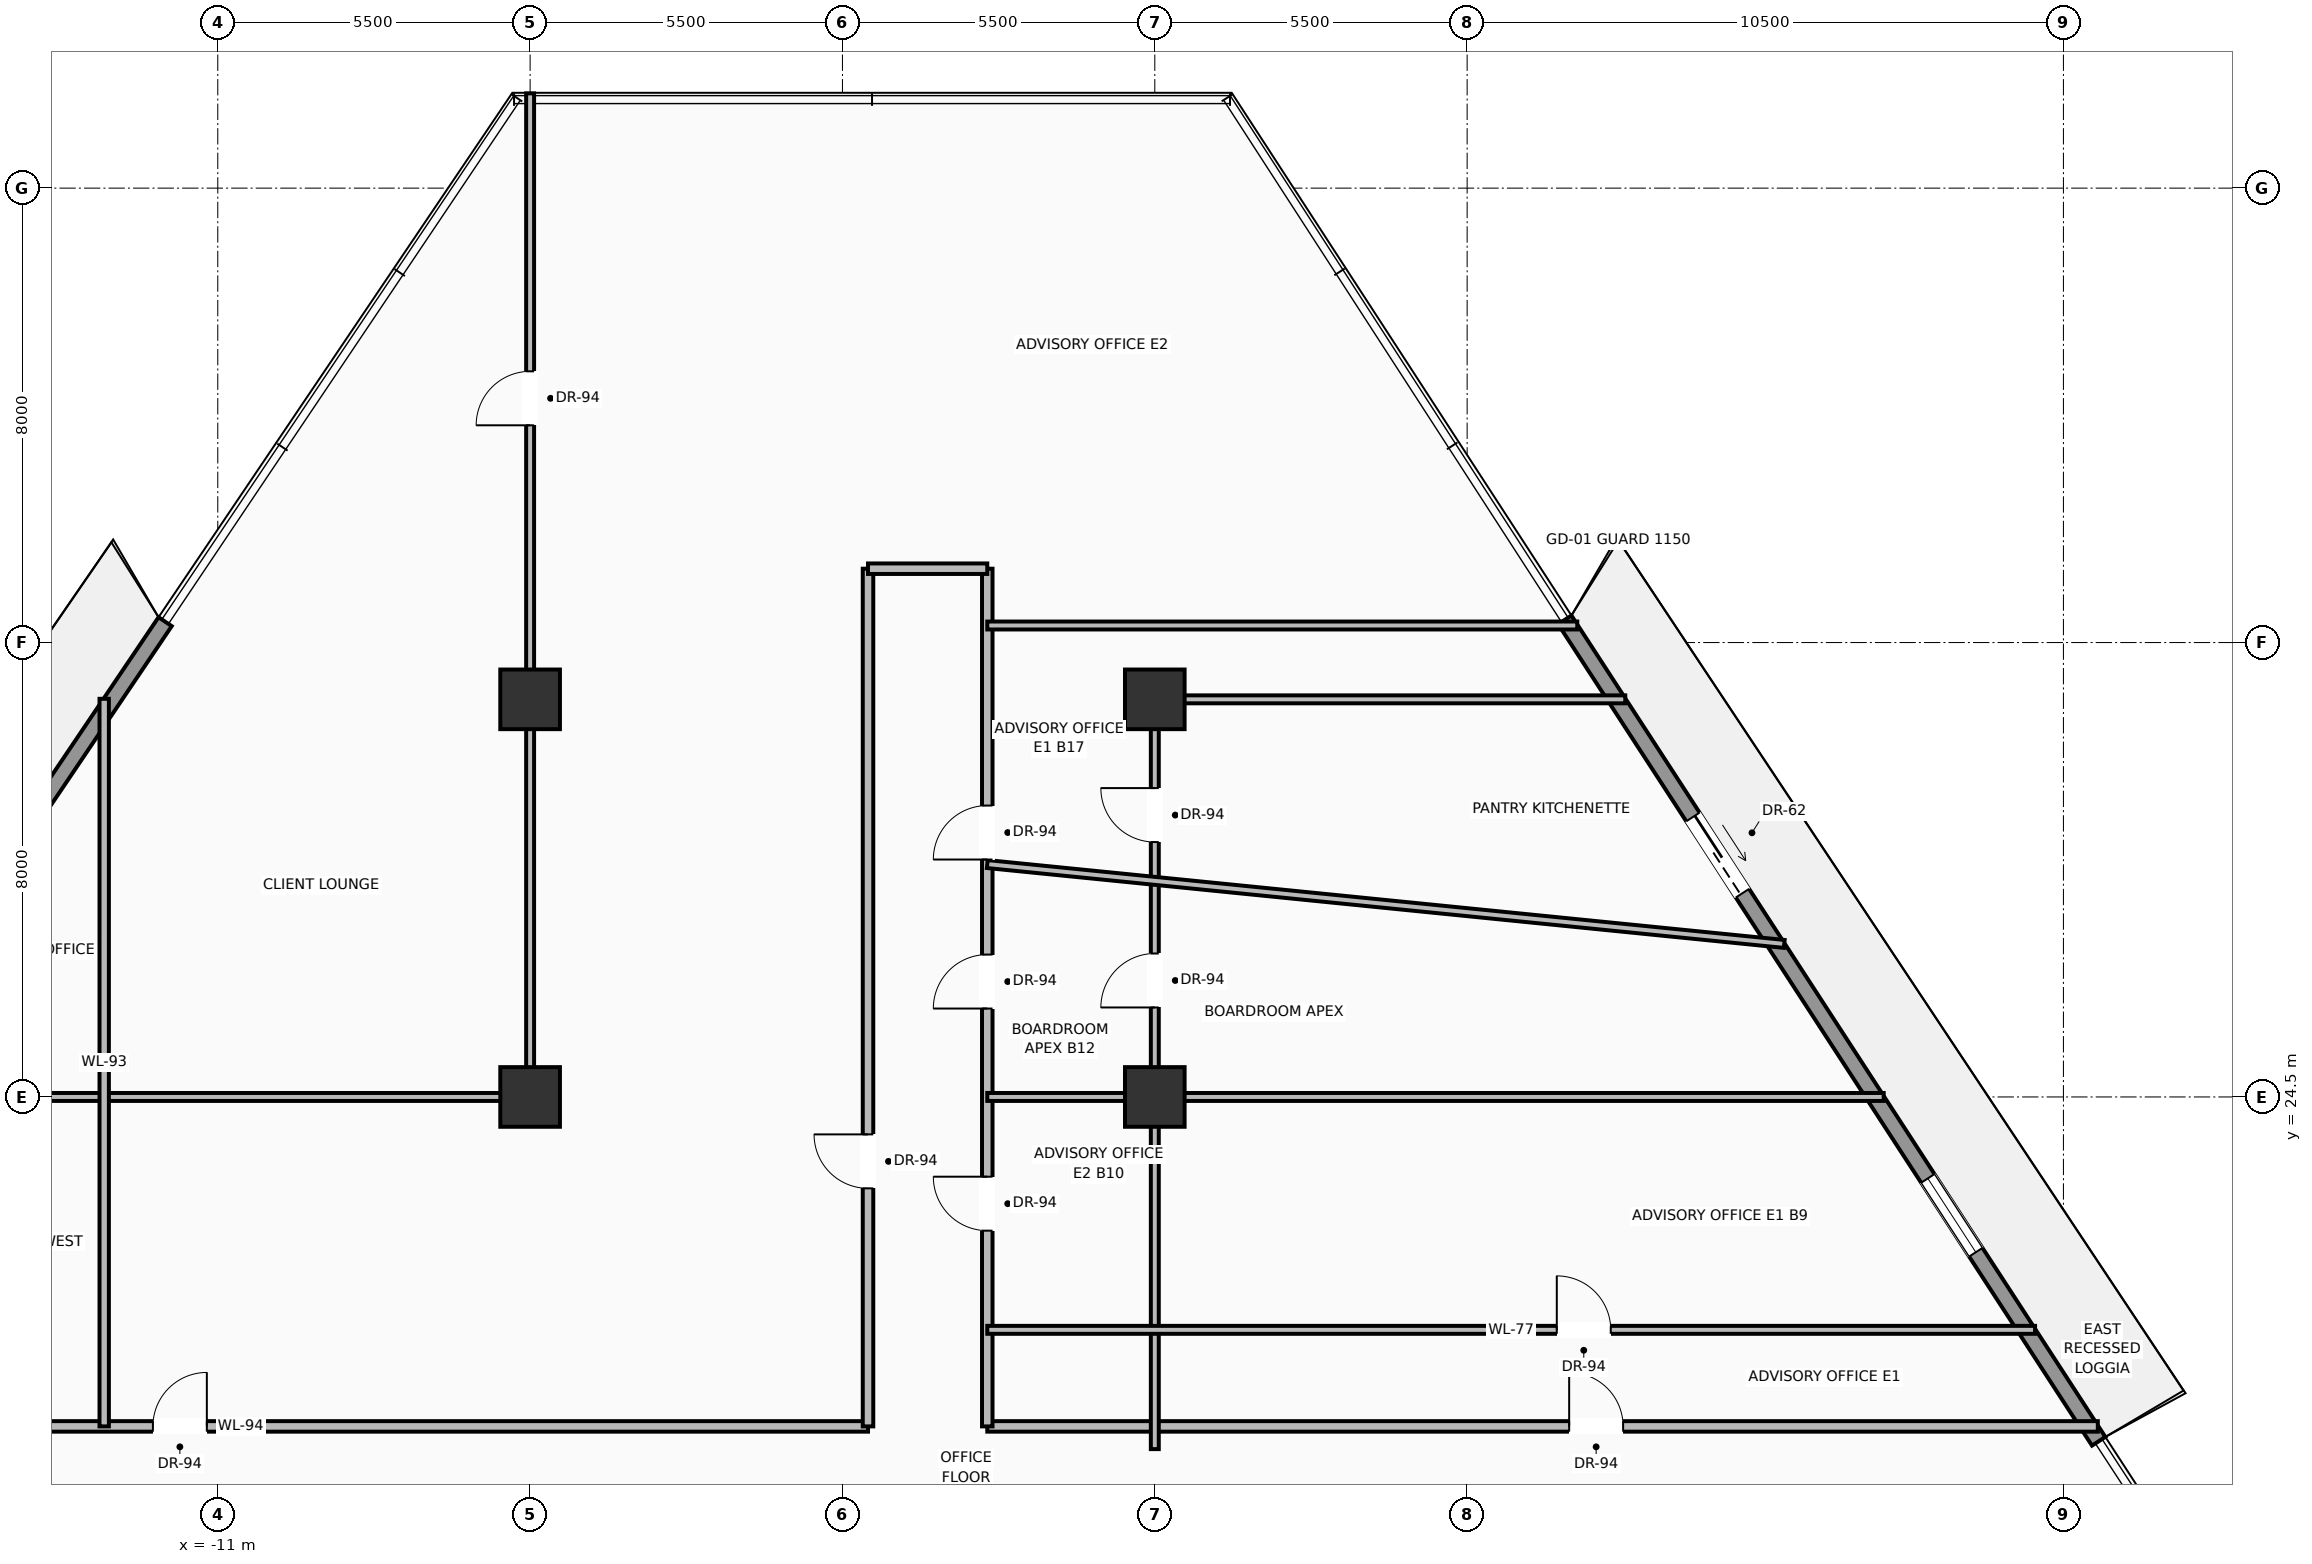
"""IFC4 building model, lengths in metres.
Left out: names, types, materials, properties, quantities, classifications, styles, units other than length and angle.
Written with IfcOpenShell. Run it as: python <this file> out.ifc"""

import sys

from ifc_helpers import new_model, si_unit, direction, frame, frame_2d, origin, origin_2d, place, context, subcontext, project, spatial, rectangle, extrude, source, transform, mapped, element, fill, save


model = new_model("IFC4")
c1 = context("Model", 3, precision=1e-05, world=origin(), true_north=direction((0.0, 1.0)))
c2 = subcontext(c1, "Body", "Model", "MODEL_VIEW")
j1 = project(units=[si_unit("LENGTHUNIT", "METRE"), si_unit("PLANEANGLEUNIT", "RADIAN")], contexts=[c1])
p1 = place(None, origin())
s1 = spatial("IfcSite", under=j1, at=p1, CompositionType="ELEMENT")
p2 = place(p1, origin())
s2 = spatial("IfcBuilding", under=s1, at=p2, CompositionType="ELEMENT")
p3 = place(p2, frame((0.0, 0.0, 87.7)))
s3 = spatial("IfcBuildingStorey", under=s2, at=p3, CompositionType="ELEMENT", Elevation=87.7)
m1 = source(origin(), c2, "Body", "SweptSolid", [
    extrude(rectangle(XDim=1.05, YDim=1.05, at=origin_2d()), origin(), (0.0, 0.0, 1.0), 3.7),
])
for number, where, z_axis, x_axis in (
    (1, (-5.5, 24.5, 0.0), (0.0, 0.0, 1.0), (1.0, 0.0, 0.0)),
    (2, (5.5, 24.5, 0.0), (0.0, 0.0, 1.0), (1.0, 0.0, 0.0)),
    (3, (-5.5, 31.5, 0.0), (0.0, 0.0, 1.0), (1.0, 0.0, 0.0)),
    (4, (5.5, 31.5, 0.0), (0.0, 0.0, 1.0), (1.0, 0.0, 0.0)),
):
    element("IfcColumn", number, at=place(p3, frame(where, z_axis=z_axis, x_axis=x_axis)), inside=s3, PredefinedType="COLUMN", context=c2, shape_type="MappedRepresentation", body=[
        mapped(m1, transform((0.0, 0.0, 0.0), scale=1.0)),
    ])
p4 = place(p3, frame((-21.717, 18.359, 0.0), z_axis=(0.0, 0.0, 1.0), x_axis=(0.559343000378, 0.828936311141, 0.0)))
e5 = element("IfcWall", 5, at=p4, inside=s3, PredefinedType="SOLIDWALL", context=c2, shape_type="SweptSolid", body=[
    extrude(rectangle(XDim=17.502, YDim=0.28, at=frame_2d((8.751, 0.0))), origin(), (0.0, 0.0, 1.0), 3.03),
])
p5 = place(p4, frame((4.201, 0.0, 0.0)))
e6 = element("IfcOpeningElement", 6, at=p5, cuts=e5, PredefinedType="OPENING", context=c2, shape_type="SweptSolid", body=[
    extrude(rectangle(XDim=1.6, YDim=2.35, at=frame_2d((0.8, 1.175))), frame((0.0, 0.15, 0.0), z_axis=(0.0, -1.0, 0.0), x_axis=(1.0, 0.0, 0.0)), (0.0, 0.0, 1.0), 0.3),
])
p6 = place(p4, frame((11.902, 0.0, 0.9)))
e7 = element("IfcOpeningElement", 7, at=p6, cuts=e5, PredefinedType="OPENING", context=c2, shape_type="SweptSolid", body=[
    extrude(rectangle(XDim=1.55, YDim=1.85, at=frame_2d((0.775, 0.925))), frame((0.0, 0.15, 0.0), z_axis=(0.0, -1.0, 0.0), x_axis=(1.0, 0.0, 0.0)), (0.0, 0.0, 1.0), 0.3),
])
p7 = place(p3, frame((12.719, 32.899, 0.0), z_axis=(0.0, 0.0, 1.0), x_axis=(0.545043573971, -0.838407718519, 0.0)))
e8 = element("IfcWall", 8, at=p7, inside=s3, PredefinedType="SOLIDWALL", context=c2, shape_type="SweptSolid", body=[
    extrude(rectangle(XDim=17.248, YDim=0.28, at=frame_2d((8.624, 0.0))), origin(), (0.0, 0.0, 1.0), 3.03),
])
p8 = place(p7, frame((4.14, 0.0, 0.0)))
e9 = element("IfcOpeningElement", 9, at=p8, cuts=e8, PredefinedType="OPENING", context=c2, shape_type="SweptSolid", body=[
    extrude(rectangle(XDim=1.6, YDim=2.35, at=frame_2d((0.8, 1.175))), frame((0.0, 0.15, 0.0), z_axis=(0.0, -1.0, 0.0), x_axis=(1.0, 0.0, 0.0)), (0.0, 0.0, 1.0), 0.3),
])
p9 = place(p7, frame((11.729, 0.0, 0.9)))
e10 = element("IfcOpeningElement", 10, at=p9, cuts=e8, PredefinedType="OPENING", context=c2, shape_type="SweptSolid", body=[
    extrude(rectangle(XDim=1.55, YDim=1.85, at=frame_2d((0.775, 0.925))), frame((0.0, 0.15, 0.0), z_axis=(0.0, -1.0, 0.0), x_axis=(1.0, 0.0, 0.0)), (0.0, 0.0, 1.0), 0.3),
])
p10 = place(p3, frame((-21.644, 18.7, 0.0), z_axis=(0.0, 0.0, 1.0), x_axis=(1.0, 0.0, 0.0)))
e11 = element("IfcWall", 11, at=p10, inside=s3, PredefinedType="PARTITIONING", context=c2, shape_type="SweptSolid", body=[
    extrude(rectangle(XDim=22.094, YDim=0.185, at=frame_2d((11.047, 0.0))), origin(), (0.0, 0.0, 1.0), 2.747),
])
p11 = place(p10, frame((9.501, 0.0, 0.0)))
e12 = element("IfcOpeningElement", 12, at=p11, cuts=e11, PredefinedType="OPENING", context=c2, shape_type="SweptSolid", body=[
    extrude(rectangle(XDim=0.95, YDim=2.2, at=frame_2d((0.475, 1.1))), frame((0.0, 0.103, 0.0), z_axis=(0.0, -1.0, 0.0), x_axis=(1.0, 0.0, 0.0)), (0.0, 0.0, 1.0), 0.205),
])
p12 = place(p10, frame((4.201, 0.0, 0.0)))
e13 = element("IfcOpeningElement", 13, at=p12, cuts=e11, PredefinedType="OPENING", context=c2, shape_type="SweptSolid", body=[
    extrude(rectangle(XDim=0.95, YDim=2.2, at=frame_2d((0.475, 1.1))), frame((0.0, 0.103, 0.0), z_axis=(0.0, -1.0, 0.0), x_axis=(1.0, 0.0, 0.0)), (0.0, 0.0, 1.0), 0.205),
])
p13 = place(p3, frame((2.55, 18.7, 0.0), z_axis=(0.0, 0.0, 1.0), x_axis=(1.0, 0.0, 0.0)))
e14 = element("IfcWall", 14, at=p13, inside=s3, PredefinedType="PARTITIONING", context=c2, shape_type="SweptSolid", body=[
    extrude(rectangle(XDim=19.555, YDim=0.185, at=frame_2d((9.778, 0.0))), origin(), (0.0, 0.0, 1.0), 2.747),
])
p14 = place(p13, frame((10.247, 0.0, 0.0)))
e15 = element("IfcOpeningElement", 15, at=p14, cuts=e14, PredefinedType="OPENING", context=c2, shape_type="SweptSolid", body=[
    extrude(rectangle(XDim=0.95, YDim=2.2, at=frame_2d((0.475, 1.1))), frame((0.0, 0.103, 0.0), z_axis=(0.0, -1.0, 0.0), x_axis=(1.0, 0.0, 0.0)), (0.0, 0.0, 1.0), 0.205),
])
p15 = place(p3, frame((0.45, 18.7, 0.0), z_axis=(0.0, 0.0, 1.0), x_axis=(0.0, 1.0, 0.0)))
e16 = element("IfcWall", 16, at=p15, inside=s3, PredefinedType="PARTITIONING", context=c2, shape_type="SweptSolid", body=[
    extrude(rectangle(XDim=15.1, YDim=0.185, at=frame_2d((7.55, 0.0))), origin(), (0.0, 0.0, 1.0), 2.747),
])
p16 = place(p15, frame((4.191, 0.0, 0.0)))
e17 = element("IfcOpeningElement", 17, at=p16, cuts=e16, PredefinedType="OPENING", context=c2, shape_type="SweptSolid", body=[
    extrude(rectangle(XDim=0.95, YDim=2.2, at=frame_2d((0.475, 1.1))), frame((0.0, 0.103, 0.0), z_axis=(0.0, -1.0, 0.0), x_axis=(1.0, 0.0, 0.0)), (0.0, 0.0, 1.0), 0.205),
])
p17 = place(p3, frame((2.55, 18.7, 0.0), z_axis=(0.0, 0.0, 1.0), x_axis=(0.0, 1.0, 0.0)))
e18 = element("IfcWall", 18, at=p17, inside=s3, PredefinedType="PARTITIONING", context=c2, shape_type="SweptSolid", body=[
    extrude(rectangle(XDim=15.1, YDim=0.185, at=frame_2d((7.55, 0.0))), origin(), (0.0, 0.0, 1.0), 2.747),
])
p18 = place(p17, frame((9.98, 0.0, 0.0)))
e19 = element("IfcOpeningElement", 19, at=p18, cuts=e18, PredefinedType="OPENING", context=c2, shape_type="SweptSolid", body=[
    extrude(rectangle(XDim=0.95, YDim=2.2, at=frame_2d((0.475, 1.1))), frame((0.0, 0.103, 0.0), z_axis=(0.0, -1.0, 0.0), x_axis=(1.0, 0.0, 0.0)), (0.0, 0.0, 1.0), 0.205),
])
p19 = place(p17, frame((3.446, 0.0, 0.0)))
e20 = element("IfcOpeningElement", 20, at=p19, cuts=e18, PredefinedType="OPENING", context=c2, shape_type="SweptSolid", body=[
    extrude(rectangle(XDim=0.95, YDim=2.2, at=frame_2d((0.475, 1.1))), frame((0.0, 0.103, 0.0), z_axis=(0.0, -1.0, 0.0), x_axis=(1.0, 0.0, 0.0)), (0.0, 0.0, 1.0), 0.205),
])
p20 = place(p17, frame((7.357, 0.0, 0.0)))
e21 = element("IfcOpeningElement", 21, at=p20, cuts=e18, PredefinedType="OPENING", context=c2, shape_type="SweptSolid", body=[
    extrude(rectangle(XDim=0.95, YDim=2.2, at=frame_2d((0.475, 1.1))), frame((0.0, 0.103, 0.0), z_axis=(0.0, -1.0, 0.0), x_axis=(1.0, 0.0, 0.0)), (0.0, 0.0, 1.0), 0.205),
])
p21 = place(p3, frame((0.45, 33.8, 0.0), z_axis=(0.0, 0.0, 1.0), x_axis=(1.0, 0.0, 0.0)))
e22 = element("IfcWall", 22, at=p21, inside=s3, PredefinedType="PARTITIONING", context=c2, shape_type="SweptSolid", body=[
    extrude(rectangle(XDim=2.1, YDim=0.185, at=frame_2d((1.05, 0.0))), origin(), (0.0, 0.0, 1.0), 3.442),
])
p22 = place(p3, frame((-5.5, 24.5, 0.0), z_axis=(0.0, 0.0, 1.0), x_axis=(0.0, 1.0, 0.0)))
e23 = element("IfcWall", 23, at=p22, inside=s3, PredefinedType="PARTITIONING", context=c2, shape_type="SweptSolid", body=[
    extrude(rectangle(XDim=17.668, YDim=0.14, at=frame_2d((8.834, 0.0))), origin(), (0.0, 0.0, 1.0), 2.747),
])
p23 = place(p22, frame((11.825, 0.0, 0.0)))
e24 = element("IfcOpeningElement", 24, at=p23, cuts=e23, PredefinedType="OPENING", context=c2, shape_type="SweptSolid", body=[
    extrude(rectangle(XDim=0.95, YDim=2.2, at=frame_2d((0.475, 1.1))), frame((0.0, 0.08, 0.0), z_axis=(0.0, -1.0, 0.0), x_axis=(1.0, 0.0, 0.0)), (0.0, 0.0, 1.0), 0.16),
])
p24 = place(p3, frame((5.5, 18.3, 0.0), z_axis=(0.0, 0.0, 1.0), x_axis=(0.0, 1.0, 0.0)))
e25 = element("IfcWall", 25, at=p24, inside=s3, PredefinedType="PARTITIONING", context=c2, shape_type="SweptSolid", body=[
    extrude(rectangle(XDim=13.2, YDim=0.14, at=frame_2d((6.6, 0.0))), origin(), (0.0, 0.0, 1.0), 2.747),
])
p25 = place(p24, frame((10.688, 0.0, 0.0)))
e26 = element("IfcOpeningElement", 26, at=p25, cuts=e25, PredefinedType="OPENING", context=c2, shape_type="SweptSolid", body=[
    extrude(rectangle(XDim=0.95, YDim=2.2, at=frame_2d((0.475, 1.1))), frame((0.0, 0.08, 0.0), z_axis=(0.0, -1.0, 0.0), x_axis=(1.0, 0.0, 0.0)), (0.0, 0.0, 1.0), 0.16),
])
p26 = place(p24, frame((7.775, 0.0, 0.0)))
e27 = element("IfcOpeningElement", 27, at=p26, cuts=e25, PredefinedType="OPENING", context=c2, shape_type="SweptSolid", body=[
    extrude(rectangle(XDim=0.95, YDim=2.2, at=frame_2d((0.475, 1.1))), frame((0.0, 0.08, 0.0), z_axis=(0.0, -1.0, 0.0), x_axis=(1.0, 0.0, 0.0)), (0.0, 0.0, 1.0), 0.16),
])
p27 = place(p3, frame((-17.73, 24.5, 0.0), z_axis=(0.0, 0.0, 1.0), x_axis=(1.0, 0.0, 0.0)))
e28 = element("IfcWall", 28, at=p27, inside=s3, PredefinedType="PARTITIONING", context=c2, shape_type="SweptSolid", body=[
    extrude(rectangle(XDim=12.23, YDim=0.14, at=frame_2d((6.115, 0.0))), origin(), (0.0, 0.0, 1.0), 2.747),
])
p28 = place(p27, frame((2.235, 0.0, 0.0)))
e29 = element("IfcOpeningElement", 29, at=p28, cuts=e28, PredefinedType="OPENING", context=c2, shape_type="SweptSolid", body=[
    extrude(rectangle(XDim=0.95, YDim=2.2, at=frame_2d((0.475, 1.1))), frame((0.0, 0.08, 0.0), z_axis=(0.0, -1.0, 0.0), x_axis=(1.0, 0.0, 0.0)), (0.0, 0.0, 1.0), 0.16),
])
p29 = place(p3, frame((5.5, 31.5, 0.0), z_axis=(0.0, 0.0, 1.0), x_axis=(1.0, 0.0, 0.0)))
e30 = element("IfcWall", 30, at=p29, inside=s3, PredefinedType="PARTITIONING", context=c2, shape_type="SweptSolid", body=[
    extrude(rectangle(XDim=8.284, YDim=0.14, at=frame_2d((4.142, 0.0))), origin(), (0.0, 0.0, 1.0), 2.747),
])
p30 = place(p3, frame((2.55, 20.4, 0.0), z_axis=(0.0, 0.0, 1.0), x_axis=(1.0, 0.0, 0.0)))
e31 = element("IfcWall", 31, at=p30, inside=s3, PredefinedType="PARTITIONING", context=c2, shape_type="SweptSolid", body=[
    extrude(rectangle(XDim=18.45, YDim=0.14, at=frame_2d((9.225, 0.0))), origin(), (0.0, 0.0, 1.0), 2.747),
])
p31 = place(p30, frame((10.029, 0.0, 0.0)))
e32 = element("IfcOpeningElement", 32, at=p31, cuts=e31, PredefinedType="OPENING", context=c2, shape_type="SweptSolid", body=[
    extrude(rectangle(XDim=0.95, YDim=2.2, at=frame_2d((0.475, 1.1))), frame((0.0, 0.08, 0.0), z_axis=(0.0, -1.0, 0.0), x_axis=(1.0, 0.0, 0.0)), (0.0, 0.0, 1.0), 0.16),
])
p32 = place(p3, frame((2.55, 24.5, 0.0), z_axis=(0.0, 0.0, 1.0), x_axis=(1.0, 0.0, 0.0)))
e33 = element("IfcWall", 33, at=p32, inside=s3, PredefinedType="PARTITIONING", context=c2, shape_type="SweptSolid", body=[
    extrude(rectangle(XDim=15.785, YDim=0.14, at=frame_2d((7.893, 0.0))), origin(), (0.0, 0.0, 1.0), 2.747),
])
p33 = place(p3, frame((2.55, 28.6, 0.0), z_axis=(0.0, 0.0, 1.0), x_axis=(0.995018663193, -0.099688815304, 0.0)))
e34 = element("IfcWall", 34, at=p33, inside=s3, PredefinedType="PARTITIONING", context=c2, shape_type="SweptSolid", body=[
    extrude(rectangle(XDim=14.104, YDim=0.14, at=frame_2d((7.052, 0.0))), origin(), (0.0, 0.0, 1.0), 2.747),
])
p34 = place(p3, frame((2.55, 32.8, 0.0), z_axis=(0.0, 0.0, 1.0), x_axis=(1.0, 0.0, 0.0)))
e35 = element("IfcWall", 35, at=p34, inside=s3, PredefinedType="PARTITIONING", context=c2, shape_type="SweptSolid", body=[
    extrude(rectangle(XDim=10.389, YDim=0.14, at=frame_2d((5.195, 0.0))), origin(), (0.0, 0.0, 1.0), 2.747),
])
p35 = place(p3, frame((-13.0, 18.7, 0.0), z_axis=(0.0, 0.0, 1.0), x_axis=(0.0, 1.0, 0.0)))
e36 = element("IfcWall", 36, at=p35, inside=s3, PredefinedType="PARTITIONING", context=c2, shape_type="SweptSolid", body=[
    extrude(rectangle(XDim=12.81, YDim=0.165, at=frame_2d((6.405, 0.0))), origin(), (0.0, 0.0, 1.0), 2.747),
])
m2 = source(origin(), c2, "Body", "SweptSolid", [
    extrude(rectangle(XDim=1.6, YDim=2.35, at=frame_2d((0.8, 1.175))), frame((0.0, 0.025, 0.0), z_axis=(0.0, -1.0, 0.0), x_axis=(1.0, 0.0, 0.0)), (0.0, 0.0, 1.0), 0.05),
])
p36 = place(p8, origin())
e37 = element("IfcDoor", 37, at=p36, inside=s3, OperationType="SLIDING_TO_RIGHT", PredefinedType="DOOR", context=c2, shape_type="MappedRepresentation", body=[
    mapped(m2, transform((0.0, 0.0, 0.0), scale=1.0)),
])
fill(e9, e37)
m3 = source(origin(), c2, "Body", "SweptSolid", [
    extrude(rectangle(XDim=1.55, YDim=1.85, at=frame_2d((0.775, 0.925))), frame((0.0, 0.03, 0.0), z_axis=(0.0, -1.0, 0.0), x_axis=(1.0, 0.0, 0.0)), (0.0, 0.0, 1.0), 0.06),
])
p37 = place(p9, origin())
e38 = element("IfcWindow", 38, at=p37, inside=s3, PartitioningType="SINGLE_PANEL", PredefinedType="WINDOW", context=c2, shape_type="MappedRepresentation", body=[
    mapped(m3, transform((0.0, 0.0, 0.0), scale=1.0)),
])
fill(e10, e38)
m4 = source(origin(), c2, "Body", "SweptSolid", [
    extrude(rectangle(XDim=0.95, YDim=2.2, at=frame_2d((0.475, 1.1))), frame((0.0, 0.025, 0.0), z_axis=(0.0, -1.0, 0.0), x_axis=(1.0, 0.0, 0.0)), (0.0, 0.0, 1.0), 0.05),
])
p38 = place(p11, origin())
e39 = element("IfcDoor", 39, at=p38, inside=s3, OperationType="SINGLE_SWING_RIGHT", PredefinedType="DOOR", context=c2, shape_type="MappedRepresentation", body=[
    mapped(m4, transform((0.0, 0.0, 0.0), scale=1.0)),
])
fill(e12, e39)
p39 = place(p14, origin())
e40 = element("IfcDoor", 40, at=p39, inside=s3, OperationType="SINGLE_SWING_LEFT", PredefinedType="DOOR", context=c2, shape_type="MappedRepresentation", body=[
    mapped(m4, transform((0.0, 0.0, 0.0), scale=1.0)),
])
fill(e15, e40)
p40 = place(p16, origin())
e41 = element("IfcDoor", 41, at=p40, inside=s3, OperationType="SINGLE_SWING_RIGHT", PredefinedType="DOOR", context=c2, shape_type="MappedRepresentation", body=[
    mapped(m4, transform((0.0, 0.0, 0.0), scale=1.0)),
])
fill(e17, e41)
p41 = place(p18, origin())
e42 = element("IfcDoor", 42, at=p41, inside=s3, OperationType="SINGLE_SWING_LEFT", PredefinedType="DOOR", context=c2, shape_type="MappedRepresentation", body=[
    mapped(m4, transform((0.0, 0.0, 0.0), scale=1.0)),
])
fill(e19, e42)
p42 = place(p31, origin())
e43 = element("IfcDoor", 43, at=p42, inside=s3, OperationType="SINGLE_SWING_LEFT", PredefinedType="DOOR", context=c2, shape_type="MappedRepresentation", body=[
    mapped(m4, transform((0.0, 0.0, 0.0), scale=1.0)),
])
fill(e32, e43)
p43 = place(p19, origin())
e44 = element("IfcDoor", 44, at=p43, inside=s3, OperationType="SINGLE_SWING_RIGHT", PredefinedType="DOOR", context=c2, shape_type="MappedRepresentation", body=[
    mapped(m4, transform((0.0, 0.0, 0.0), scale=1.0)),
])
fill(e20, e44)
p44 = place(p20, origin())
e45 = element("IfcDoor", 45, at=p44, inside=s3, OperationType="SINGLE_SWING_LEFT", PredefinedType="DOOR", context=c2, shape_type="MappedRepresentation", body=[
    mapped(m4, transform((0.0, 0.0, 0.0), scale=1.0)),
])
fill(e21, e45)
p45 = place(p25, origin())
e46 = element("IfcDoor", 46, at=p45, inside=s3, OperationType="SINGLE_SWING_RIGHT", PredefinedType="DOOR", context=c2, shape_type="MappedRepresentation", body=[
    mapped(m4, transform((0.0, 0.0, 0.0), scale=1.0)),
])
fill(e26, e46)
p46 = place(p23, origin())
e47 = element("IfcDoor", 47, at=p46, inside=s3, OperationType="SINGLE_SWING_LEFT", PredefinedType="DOOR", context=c2, shape_type="MappedRepresentation", body=[
    mapped(m4, transform((0.0, 0.0, 0.0), scale=1.0)),
])
fill(e24, e47)
p47 = place(p26, origin())
e48 = element("IfcDoor", 48, at=p47, inside=s3, OperationType="SINGLE_SWING_LEFT", PredefinedType="DOOR", context=c2, shape_type="MappedRepresentation", body=[
    mapped(m4, transform((0.0, 0.0, 0.0), scale=1.0)),
])
fill(e27, e48)
save(model, sys.argv[1])
